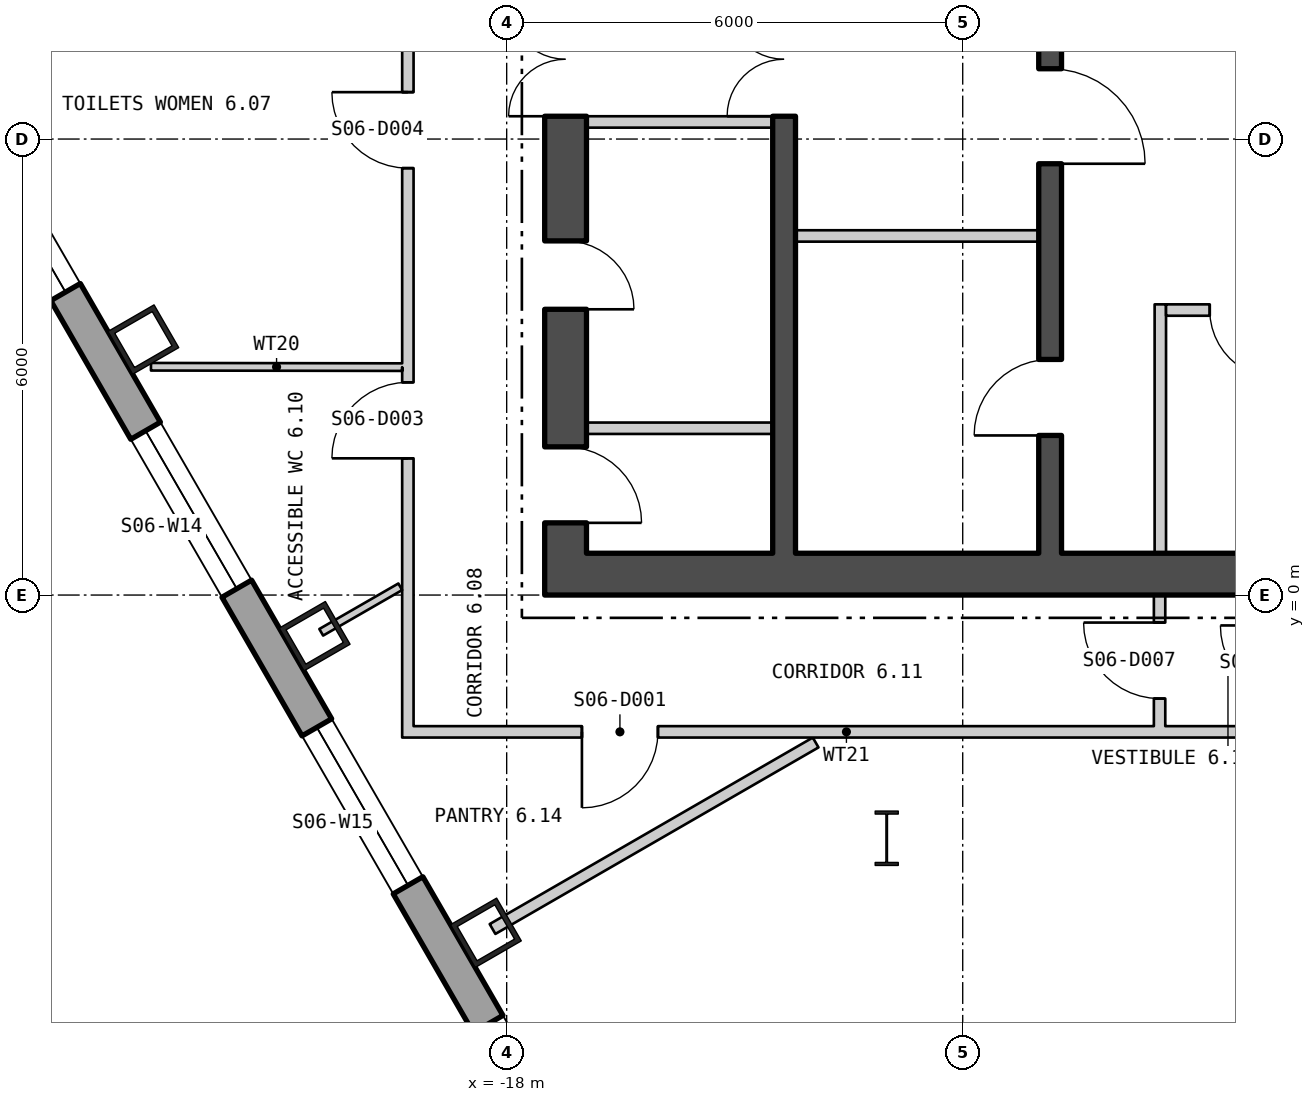
"""IFC4 building model, lengths in metres.
Left out: names, types, materials, properties, quantities, classifications, styles, units other than length and angle.
Written with IfcOpenShell. Run it as: python <this file> out.ifc"""

import sys

from ifc_helpers import new_model, si_unit, direction, frame, frame_2d, origin, origin_2d, place, context, subcontext, project, spatial, polyline, rectangle, hollow_rectangle, i_section, outline, extrude, element, fill, save


model = new_model("IFC4")
c1 = context("Model", 3, precision=1e-05, world=origin(), true_north=direction((0.0, 1.0)))
c2 = subcontext(c1, "Body", "Model", "MODEL_VIEW")
j1 = project(units=[si_unit("LENGTHUNIT", "METRE"), si_unit("PLANEANGLEUNIT", "RADIAN")], contexts=[c1])
p1 = place(None, origin())
s1 = spatial("IfcSite", under=j1, at=p1, CompositionType="ELEMENT")
p2 = place(p1, origin())
s2 = spatial("IfcBuilding", under=s1, at=p2, CompositionType="ELEMENT")
p3 = place(p2, frame((0.0, 0.0, 84.3)))
s3 = spatial("IfcBuildingStorey", under=s2, at=p3, CompositionType="ELEMENT", Elevation=84.3)
for number, where, z_axis, x_axis in (
    (1, (-22.78, 3.362, 0.0), (0.0, 0.0, 1.0), (0.5, -0.866, 0.0)),
    (2, (-20.526, -0.541, 0.0), (0.0, 0.0, 1.0), (0.5, -0.866, 0.0)),
    (3, (-18.273, -4.444, 0.0), (0.0, 0.0, 1.0), (0.5, -0.866, 0.0)),
):
    element("IfcColumn", number, at=place(p3, frame(where, z_axis=z_axis, x_axis=x_axis)), inside=s3, PredefinedType="COLUMN", context=c2, shape_type="SweptSolid", body=[
        extrude(hollow_rectangle(XDim=0.65, YDim=0.7, WallThickness=0.065, at=origin_2d()), origin(), (0.0, 0.0, 1.0), 4.5),
    ])
p4 = place(p3, frame((-13.0, -3.2, 0.0), z_axis=(0.0, 0.0, 1.0), x_axis=(1.0, 0.0, 0.0)))
e4 = element("IfcColumn", 4, at=p4, inside=s3, PredefinedType="COLUMN", context=c2, shape_type="SweptSolid", body=[
    extrude(i_section(OverallWidth=0.304, OverallDepth=0.716, WebThickness=0.021, FlangeThickness=0.04, at=origin_2d()), origin(), (0.0, 0.0, 1.0), 4.5),
])
p5 = place(p3, frame((-27.95, 11.167, -0.18), z_axis=(0.0, 0.0, 1.0), x_axis=(0.499999194392, -0.866025868902, 0.0)))
e5 = element("IfcWall", 5, at=p5, inside=s3, PredefinedType="SOLIDWALL", context=c2, shape_type="SweptSolid", body=[
    extrude(outline(polyline([(-0.13, -0.225), (45.86, -0.225), (45.6, 0.225), (0.13, 0.225), (-0.13, -0.225)])), origin(), (0.0, 0.0, 1.0), 4.28),
])
p6 = place(p5, frame((5.892, 0.0, 1.08)))
e6 = element("IfcOpeningElement", 6, at=p6, cuts=e5, PredefinedType="OPENING", context=c2, shape_type="SweptSolid", body=[
    extrude(rectangle(XDim=2.4, YDim=2.6, at=frame_2d((1.2, 1.3))), frame((0.0, 0.235, 0.0), z_axis=(0.0, -1.0, 0.0), x_axis=(1.0, 0.0, 0.0)), (0.0, 0.0, 1.0), 0.47),
])
p7 = place(p5, frame((10.399, 0.0, 1.08)))
e7 = element("IfcOpeningElement", 7, at=p7, cuts=e5, PredefinedType="OPENING", context=c2, shape_type="SweptSolid", body=[
    extrude(rectangle(XDim=2.4, YDim=2.6, at=frame_2d((1.2, 1.3))), frame((0.0, 0.235, 0.0), z_axis=(0.0, -1.0, 0.0), x_axis=(1.0, 0.0, 0.0)), (0.0, 0.0, 1.0), 0.47),
])
p8 = place(p5, frame((14.905, 0.0, 1.08)))
e8 = element("IfcOpeningElement", 8, at=p8, cuts=e5, PredefinedType="OPENING", context=c2, shape_type="SweptSolid", body=[
    extrude(rectangle(XDim=2.4, YDim=2.6, at=frame_2d((1.2, 1.3))), frame((0.0, 0.235, 0.0), z_axis=(0.0, -1.0, 0.0), x_axis=(1.0, 0.0, 0.0)), (0.0, 0.0, 1.0), 0.47),
])
p9 = place(p5, frame((19.412, 0.0, 1.08)))
e9 = element("IfcOpeningElement", 9, at=p9, cuts=e5, PredefinedType="OPENING", context=c2, shape_type="SweptSolid", body=[
    extrude(rectangle(XDim=2.4, YDim=2.6, at=frame_2d((1.2, 1.3))), frame((0.0, 0.235, 0.0), z_axis=(0.0, -1.0, 0.0), x_axis=(1.0, 0.0, 0.0)), (0.0, 0.0, 1.0), 0.47),
])
p10 = place(p5, frame((23.918, 0.0, 1.08)))
e10 = element("IfcOpeningElement", 10, at=p10, cuts=e5, PredefinedType="OPENING", context=c2, shape_type="SweptSolid", body=[
    extrude(rectangle(XDim=2.4, YDim=2.6, at=frame_2d((1.2, 1.3))), frame((0.0, 0.235, 0.0), z_axis=(0.0, -1.0, 0.0), x_axis=(1.0, 0.0, 0.0)), (0.0, 0.0, 1.0), 0.47),
])
p11 = place(p5, frame((28.425, 0.0, 1.08)))
e11 = element("IfcOpeningElement", 11, at=p11, cuts=e5, PredefinedType="OPENING", context=c2, shape_type="SweptSolid", body=[
    extrude(rectangle(XDim=2.4, YDim=2.6, at=frame_2d((1.2, 1.3))), frame((0.0, 0.235, 0.0), z_axis=(0.0, -1.0, 0.0), x_axis=(1.0, 0.0, 0.0)), (0.0, 0.0, 1.0), 0.47),
])
p12 = place(p5, frame((32.932, 0.0, 1.08)))
e12 = element("IfcOpeningElement", 12, at=p12, cuts=e5, PredefinedType="OPENING", context=c2, shape_type="SweptSolid", body=[
    extrude(rectangle(XDim=2.4, YDim=2.6, at=frame_2d((1.2, 1.3))), frame((0.0, 0.235, 0.0), z_axis=(0.0, -1.0, 0.0), x_axis=(1.0, 0.0, 0.0)), (0.0, 0.0, 1.0), 0.47),
])
p13 = place(p5, frame((37.438, 0.0, 1.08)))
e13 = element("IfcOpeningElement", 13, at=p13, cuts=e5, PredefinedType="OPENING", context=c2, shape_type="SweptSolid", body=[
    extrude(rectangle(XDim=2.4, YDim=2.6, at=frame_2d((1.2, 1.3))), frame((0.0, 0.235, 0.0), z_axis=(0.0, -1.0, 0.0), x_axis=(1.0, 0.0, 0.0)), (0.0, 0.0, 1.0), 0.47),
])
p14 = place(p5, frame((41.907, 0.0, 1.08)))
e14 = element("IfcOpeningElement", 14, at=p14, cuts=e5, PredefinedType="OPENING", context=c2, shape_type="SweptSolid", body=[
    extrude(rectangle(XDim=2.4, YDim=2.6, at=frame_2d((1.2, 1.3))), frame((0.0, 0.235, 0.0), z_axis=(0.0, -1.0, 0.0), x_axis=(1.0, 0.0, 0.0)), (0.0, 0.0, 1.0), 0.47),
])
p15 = place(p3, frame((-17.5, 0.275, 0.0), z_axis=(0.0, 0.0, 1.0), x_axis=(1.0, 0.0, 0.0)))
e15 = element("IfcWall", 15, at=p15, inside=s3, PredefinedType="SHEAR", context=c2, shape_type="SweptSolid", body=[
    extrude(rectangle(XDim=35.0, YDim=0.55, at=frame_2d((17.5, 0.0))), origin(), (0.0, 0.0, 1.0), 4.3),
])
p16 = place(p15, frame((12.0, 0.0, 0.0)))
e16 = element("IfcOpeningElement", 16, at=p16, cuts=e15, PredefinedType="OPENING", context=c2, shape_type="SweptSolid", body=[
    extrude(rectangle(XDim=1.8, YDim=2.4, at=frame_2d((0.9, 1.2))), frame((0.0, 0.285, 0.0), z_axis=(0.0, -1.0, 0.0), x_axis=(1.0, 0.0, 0.0)), (0.0, 0.0, 1.0), 0.57),
])
p17 = place(p15, frame((22.0, 0.0, 0.0)))
e17 = element("IfcOpeningElement", 17, at=p17, cuts=e15, PredefinedType="OPENING", context=c2, shape_type="SweptSolid", body=[
    extrude(rectangle(XDim=1.8, YDim=2.4, at=frame_2d((0.9, 1.2))), frame((0.0, 0.285, 0.0), z_axis=(0.0, -1.0, 0.0), x_axis=(1.0, 0.0, 0.0)), (0.0, 0.0, 1.0), 0.57),
])
p18 = place(p3, frame((-17.225, 0.55, 0.0), z_axis=(0.0, 0.0, 1.0), x_axis=(0.0, 1.0, 0.0)))
e18 = element("IfcWall", 18, at=p18, inside=s3, PredefinedType="SHEAR", context=c2, shape_type="SweptSolid", body=[
    extrude(rectangle(XDim=16.9, YDim=0.55, at=frame_2d((8.45, 0.0))), origin(), (0.0, 0.0, 1.0), 4.3),
])
p19 = place(p18, frame((5.75, 0.0, 0.0)))
e19 = element("IfcOpeningElement", 19, at=p19, cuts=e18, PredefinedType="OPENING", context=c2, shape_type="SweptSolid", body=[
    extrude(rectangle(XDim=1.5, YDim=2.1, at=frame_2d((0.75, 1.05))), frame((0.0, 0.285, 0.0), z_axis=(0.0, -1.0, 0.0), x_axis=(1.0, 0.0, 0.0)), (0.0, 0.0, 1.0), 0.57),
])
p20 = place(p18, frame((0.4, 0.0, 0.0)))
e20 = element("IfcOpeningElement", 20, at=p20, cuts=e18, PredefinedType="OPENING", context=c2, shape_type="SweptSolid", body=[
    extrude(rectangle(XDim=1.0, YDim=2.1, at=frame_2d((0.5, 1.05))), frame((0.0, 0.285, 0.0), z_axis=(0.0, -1.0, 0.0), x_axis=(1.0, 0.0, 0.0)), (0.0, 0.0, 1.0), 0.57),
])
p21 = place(p18, frame((3.21, 0.0, 0.0)))
e21 = element("IfcOpeningElement", 21, at=p21, cuts=e18, PredefinedType="OPENING", context=c2, shape_type="SweptSolid", body=[
    extrude(rectangle(XDim=0.9, YDim=2.1, at=frame_2d((0.45, 1.05))), frame((0.0, 0.285, 0.0), z_axis=(0.0, -1.0, 0.0), x_axis=(1.0, 0.0, 0.0)), (0.0, 0.0, 1.0), 0.57),
])
p22 = place(p18, frame((8.141, 0.0, 0.0)))
e22 = element("IfcOpeningElement", 22, at=p22, cuts=e18, PredefinedType="OPENING", context=c2, shape_type="SweptSolid", body=[
    extrude(rectangle(XDim=0.9, YDim=2.1, at=frame_2d((0.45, 1.05))), frame((0.0, 0.285, 0.0), z_axis=(0.0, -1.0, 0.0), x_axis=(1.0, 0.0, 0.0)), (0.0, 0.0, 1.0), 0.57),
])
p23 = place(p18, frame((12.966, 0.0, 0.0)))
e23 = element("IfcOpeningElement", 23, at=p23, cuts=e18, PredefinedType="OPENING", context=c2, shape_type="SweptSolid", body=[
    extrude(rectangle(XDim=0.9, YDim=2.1, at=frame_2d((0.45, 1.05))), frame((0.0, 0.285, 0.0), z_axis=(0.0, -1.0, 0.0), x_axis=(1.0, 0.0, 0.0)), (0.0, 0.0, 1.0), 0.57),
])
p24 = place(p3, frame((-10.85, 0.55, 0.0), z_axis=(0.0, 0.0, 1.0), x_axis=(0.0, 1.0, 0.0)))
e24 = element("IfcWall", 24, at=p24, inside=s3, PredefinedType="SHEAR", context=c2, shape_type="SweptSolid", body=[
    extrude(rectangle(XDim=16.9, YDim=0.3, at=frame_2d((8.45, 0.0))), origin(), (0.0, 0.0, 1.0), 4.3),
])
p25 = place(p24, frame((5.125, 0.0, 0.0)))
e25 = element("IfcOpeningElement", 25, at=p25, cuts=e24, PredefinedType="OPENING", context=c2, shape_type="SweptSolid", body=[
    extrude(rectangle(XDim=1.25, YDim=2.1, at=frame_2d((0.625, 1.05))), frame((0.0, 0.16, 0.0), z_axis=(0.0, -1.0, 0.0), x_axis=(1.0, 0.0, 0.0)), (0.0, 0.0, 1.0), 0.32),
])
p26 = place(p24, frame((1.55, 0.0, 0.0)))
e26 = element("IfcOpeningElement", 26, at=p26, cuts=e24, PredefinedType="OPENING", context=c2, shape_type="SweptSolid", body=[
    extrude(rectangle(XDim=1.0, YDim=2.1, at=frame_2d((0.5, 1.05))), frame((0.0, 0.16, 0.0), z_axis=(0.0, -1.0, 0.0), x_axis=(1.0, 0.0, 0.0)), (0.0, 0.0, 1.0), 0.32),
])
p27 = place(p3, frame((-14.35, 0.55, 0.0), z_axis=(0.0, 0.0, 1.0), x_axis=(0.0, 1.0, 0.0)))
e27 = element("IfcWall", 27, at=p27, inside=s3, PredefinedType="SHEAR", context=c2, shape_type="SweptSolid", body=[
    extrude(rectangle(XDim=16.9, YDim=0.3, at=frame_2d((8.45, 0.0))), origin(), (0.0, 0.0, 1.0), 4.3),
])
p28 = place(p27, frame((5.75, 0.0, 0.0)))
e28 = element("IfcOpeningElement", 28, at=p28, cuts=e27, PredefinedType="OPENING", context=c2, shape_type="SweptSolid", body=[
    extrude(rectangle(XDim=1.5, YDim=2.1, at=frame_2d((0.75, 1.05))), frame((0.0, 0.16, 0.0), z_axis=(0.0, -1.0, 0.0), x_axis=(1.0, 0.0, 0.0)), (0.0, 0.0, 1.0), 0.32),
])
p29 = place(p3, frame((-14.2, 4.725, 0.0), z_axis=(0.0, 0.0, 1.0), x_axis=(1.0, 0.0, 0.0)))
e29 = element("IfcWall", 29, at=p29, inside=s3, PredefinedType="PARTITIONING", context=c2, shape_type="SweptSolid", body=[
    extrude(rectangle(XDim=3.2, YDim=0.15, at=frame_2d((1.6, 0.0))), origin(), (0.0, 0.0, 1.0), 4.3),
])
for number, where, z_axis, x_axis in (
    (30, (-16.95, 6.225, 0.0), (0.0, 0.0, 1.0), (1.0, 0.0, 0.0)),
    (31, (-16.95, 2.195, 0.0), (0.0, 0.0, 1.0), (1.0, 0.0, 0.0)),
):
    element("IfcWall", number, at=place(p3, frame(where, z_axis=z_axis, x_axis=x_axis)), inside=s3, PredefinedType="PARTITIONING", context=c2, shape_type="SweptSolid", body=[
        extrude(rectangle(XDim=2.45, YDim=0.15, at=frame_2d((1.225, 0.0))), origin(), (0.0, 0.0, 1.0), 4.3),
    ])
p30 = place(p3, frame((-9.4, 0.55, 0.0), z_axis=(0.0, 0.0, 1.0), x_axis=(0.0, 1.0, 0.0)))
e32 = element("IfcWall", 32, at=p30, inside=s3, PredefinedType="PARTITIONING", context=c2, shape_type="SweptSolid", body=[
    extrude(rectangle(XDim=3.275, YDim=0.15, at=frame_2d((1.637, 0.0))), origin(), (0.0, 0.0, 1.0), 4.3),
])
p31 = place(p3, frame((-9.325, 3.75, 0.0), z_axis=(0.0, 0.0, 1.0), x_axis=(1.0, 0.0, 0.0)))
e33 = element("IfcWall", 33, at=p31, inside=s3, PredefinedType="PARTITIONING", context=c2, shape_type="SweptSolid", body=[
    extrude(rectangle(XDim=2.05, YDim=0.15, at=frame_2d((1.025, 0.0))), origin(), (0.0, 0.0, 1.0), 4.3),
])
p32 = place(p31, frame((0.575, 0.0, 0.0)))
e34 = element("IfcOpeningElement", 34, at=p32, cuts=e33, PredefinedType="OPENING", context=c2, shape_type="SweptSolid", body=[
    extrude(rectangle(XDim=0.9, YDim=2.1, at=frame_2d((0.45, 1.05))), frame((0.0, 0.085, 0.0), z_axis=(0.0, -1.0, 0.0), x_axis=(1.0, 0.0, 0.0)), (0.0, 0.0, 1.0), 0.17),
])
p33 = place(p3, frame((-22.68, 3.004, 0.0), z_axis=(0.0, 0.0, 1.0), x_axis=(0.99999885563, -0.001512857573, 0.0)))
e35 = element("IfcWall", 35, at=p33, inside=s3, PredefinedType="PARTITIONING", context=c2, shape_type="SweptSolid", body=[
    extrude(rectangle(XDim=3.305, YDim=0.1, at=frame_2d((1.653, 0.0))), origin(), (0.0, 0.0, 1.0), 3.8),
])
p34 = place(p3, frame((-20.44, -0.49, 0.0), z_axis=(0.0, 0.0, 1.0), x_axis=(0.866546020567, 0.499097179154, 0.0)))
e36 = element("IfcWall", 36, at=p34, inside=s3, PredefinedType="PARTITIONING", context=c2, shape_type="SweptSolid", body=[
    extrude(rectangle(XDim=1.2, YDim=0.1, at=frame_2d((0.6, 0.0))), origin(), (0.0, 0.0, 1.0), 4.3),
])
p35 = place(p3, frame((-19.375, -1.8, 0.0), z_axis=(0.0, 0.0, 1.0), x_axis=(1.0, 0.0, 0.0)))
e37 = element("IfcWall", 37, at=p35, inside=s3, PredefinedType="PARTITIONING", context=c2, shape_type="SweptSolid", body=[
    extrude(rectangle(XDim=11.69, YDim=0.15, at=frame_2d((5.845, 0.0))), origin(), (0.0, 0.0, 1.0), 4.3),
])
p36 = place(p35, frame((2.365, 0.0, 0.0)))
e38 = element("IfcOpeningElement", 38, at=p36, cuts=e37, PredefinedType="OPENING", context=c2, shape_type="SweptSolid", body=[
    extrude(rectangle(XDim=1.0, YDim=2.1, at=frame_2d((0.5, 1.05))), frame((0.0, 0.085, 0.0), z_axis=(0.0, -1.0, 0.0), x_axis=(1.0, 0.0, 0.0)), (0.0, 0.0, 1.0), 0.17),
])
p37 = place(p3, frame((-19.3, -1.725, 0.0), z_axis=(0.0, 0.0, 1.0), x_axis=(0.0, 1.0, 0.0)))
e39 = element("IfcWall", 39, at=p37, inside=s3, PredefinedType="PARTITIONING", context=c2, shape_type="SweptSolid", body=[
    extrude(rectangle(XDim=11.11, YDim=0.15, at=frame_2d((5.555, 0.0))), origin(), (0.0, 0.0, 1.0), 4.3),
])
p38 = place(p37, frame((3.524, 0.0, 0.0)))
e40 = element("IfcOpeningElement", 40, at=p38, cuts=e39, PredefinedType="OPENING", context=c2, shape_type="SweptSolid", body=[
    extrude(rectangle(XDim=1.0, YDim=2.1, at=frame_2d((0.5, 1.05))), frame((0.0, 0.085, 0.0), z_axis=(0.0, -1.0, 0.0), x_axis=(1.0, 0.0, 0.0)), (0.0, 0.0, 1.0), 0.17),
])
p39 = place(p37, frame((7.342, 0.0, 0.0)))
e41 = element("IfcOpeningElement", 41, at=p39, cuts=e39, PredefinedType="OPENING", context=c2, shape_type="SweptSolid", body=[
    extrude(rectangle(XDim=1.0, YDim=2.1, at=frame_2d((0.5, 1.05))), frame((0.0, 0.085, 0.0), z_axis=(0.0, -1.0, 0.0), x_axis=(1.0, 0.0, 0.0)), (0.0, 0.0, 1.0), 0.17),
])
p40 = place(p3, frame((-18.186, -4.394, 0.0), z_axis=(0.0, 0.0, 1.0), x_axis=(0.866053278629, 0.499951716245, 0.0)))
e42 = element("IfcWall", 42, at=p40, inside=s3, PredefinedType="PARTITIONING", context=c2, shape_type="SweptSolid", body=[
    extrude(rectangle(XDim=4.909, YDim=0.15, at=frame_2d((2.454, 0.0))), origin(), (0.0, 0.0, 1.0), 4.3),
])
p41 = place(p3, frame((-9.41, -1.725, 0.0), z_axis=(0.0, 0.0, 1.0), x_axis=(0.0, 1.0, 0.0)))
e43 = element("IfcWall", 43, at=p41, inside=s3, PredefinedType="PARTITIONING", context=c2, shape_type="SweptSolid", body=[
    extrude(rectangle(XDim=1.725, YDim=0.15, at=frame_2d((0.863, 0.0))), origin(), (0.0, 0.0, 1.0), 4.3),
])
p42 = place(p41, frame((0.363, 0.0, 0.0)))
e44 = element("IfcOpeningElement", 44, at=p42, cuts=e43, PredefinedType="OPENING", context=c2, shape_type="SweptSolid", body=[
    extrude(rectangle(XDim=1.0, YDim=2.1, at=frame_2d((0.5, 1.05))), frame((0.0, 0.085, 0.0), z_axis=(0.0, -1.0, 0.0), x_axis=(1.0, 0.0, 0.0)), (0.0, 0.0, 1.0), 0.17),
])
p43 = place(p6, origin())
e45 = element("IfcWindow", 45, at=p43, inside=s3, PartitioningType="SINGLE_PANEL", PredefinedType="WINDOW", context=c2, shape_type="SweptSolid", body=[
    extrude(rectangle(XDim=2.4, YDim=2.6, at=frame_2d((1.2, 1.3))), frame((0.0, 0.105, 0.0), z_axis=(0.0, -1.0, 0.0), x_axis=(1.0, 0.0, 0.0)), (0.0, 0.0, 1.0), 0.06),
])
fill(e6, e45)
p44 = place(p7, origin())
e46 = element("IfcWindow", 46, at=p44, inside=s3, PartitioningType="SINGLE_PANEL", PredefinedType="WINDOW", context=c2, shape_type="SweptSolid", body=[
    extrude(rectangle(XDim=2.4, YDim=2.6, at=frame_2d((1.2, 1.3))), frame((0.0, 0.105, 0.0), z_axis=(0.0, -1.0, 0.0), x_axis=(1.0, 0.0, 0.0)), (0.0, 0.0, 1.0), 0.06),
])
fill(e7, e46)
p45 = place(p8, origin())
e47 = element("IfcWindow", 47, at=p45, inside=s3, PartitioningType="SINGLE_PANEL", PredefinedType="WINDOW", context=c2, shape_type="SweptSolid", body=[
    extrude(rectangle(XDim=2.4, YDim=2.6, at=frame_2d((1.2, 1.3))), frame((0.0, 0.105, 0.0), z_axis=(0.0, -1.0, 0.0), x_axis=(1.0, 0.0, 0.0)), (0.0, 0.0, 1.0), 0.06),
])
fill(e8, e47)
p46 = place(p9, origin())
e48 = element("IfcWindow", 48, at=p46, inside=s3, PartitioningType="SINGLE_PANEL", PredefinedType="WINDOW", context=c2, shape_type="SweptSolid", body=[
    extrude(rectangle(XDim=2.4, YDim=2.6, at=frame_2d((1.2, 1.3))), frame((0.0, 0.105, 0.0), z_axis=(0.0, -1.0, 0.0), x_axis=(1.0, 0.0, 0.0)), (0.0, 0.0, 1.0), 0.06),
])
fill(e9, e48)
p47 = place(p25, origin())
e49 = element("IfcDoor", 49, at=p47, inside=s3, OperationType="SINGLE_SWING_LEFT", PredefinedType="DOOR", context=c2, shape_type="SweptSolid", body=[
    extrude(rectangle(XDim=1.25, YDim=2.1, at=frame_2d((0.625, 1.05))), frame((0.0, 0.025, 0.0), z_axis=(0.0, -1.0, 0.0), x_axis=(1.0, 0.0, 0.0)), (0.0, 0.0, 1.0), 0.05),
])
fill(e25, e49)
p48 = place(p26, origin())
e50 = element("IfcDoor", 50, at=p48, inside=s3, OperationType="SINGLE_SWING_RIGHT", PredefinedType="DOOR", context=c2, shape_type="SweptSolid", body=[
    extrude(rectangle(XDim=1.0, YDim=2.1, at=frame_2d((0.5, 1.05))), frame((0.0, 0.025, 0.0), z_axis=(0.0, -1.0, 0.0), x_axis=(1.0, 0.0, 0.0)), (0.0, 0.0, 1.0), 0.05),
])
fill(e26, e50)
p49 = place(p28, origin())
e51 = element("IfcDoor", 51, at=p49, inside=s3, OperationType="DOUBLE_DOOR_SINGLE_SWING", PredefinedType="DOOR", context=c2, shape_type="SweptSolid", body=[
    extrude(rectangle(XDim=1.5, YDim=2.1, at=frame_2d((0.75, 1.05))), frame((0.0, 0.025, 0.0), z_axis=(0.0, -1.0, 0.0), x_axis=(1.0, 0.0, 0.0)), (0.0, 0.0, 1.0), 0.05),
])
fill(e28, e51)
p50 = place(p19, origin())
e52 = element("IfcDoor", 52, at=p50, inside=s3, OperationType="DOUBLE_DOOR_SINGLE_SWING", PredefinedType="DOOR", context=c2, shape_type="SweptSolid", body=[
    extrude(rectangle(XDim=1.5, YDim=2.1, at=frame_2d((0.75, 1.05))), frame((0.0, 0.025, 0.0), z_axis=(0.0, -1.0, 0.0), x_axis=(1.0, 0.0, 0.0)), (0.0, 0.0, 1.0), 0.05),
])
fill(e19, e52)
p51 = place(p20, origin())
e53 = element("IfcDoor", 53, at=p51, inside=s3, OperationType="SINGLE_SWING_LEFT", PredefinedType="DOOR", context=c2, shape_type="SweptSolid", body=[
    extrude(rectangle(XDim=1.0, YDim=2.1, at=frame_2d((0.5, 1.05))), frame((0.0, 0.025, 0.0), z_axis=(0.0, -1.0, 0.0), x_axis=(1.0, 0.0, 0.0)), (0.0, 0.0, 1.0), 0.05),
])
fill(e20, e53)
p52 = place(p21, origin())
e54 = element("IfcDoor", 54, at=p52, inside=s3, OperationType="SINGLE_SWING_LEFT", PredefinedType="DOOR", context=c2, shape_type="SweptSolid", body=[
    extrude(rectangle(XDim=0.9, YDim=2.1, at=frame_2d((0.45, 1.05))), frame((0.0, 0.025, 0.0), z_axis=(0.0, -1.0, 0.0), x_axis=(1.0, 0.0, 0.0)), (0.0, 0.0, 1.0), 0.05),
])
fill(e21, e54)
p53 = place(p32, origin())
e55 = element("IfcDoor", 55, at=p53, inside=s3, OperationType="SINGLE_SWING_RIGHT", PredefinedType="DOOR", context=c2, shape_type="SweptSolid", body=[
    extrude(rectangle(XDim=0.9, YDim=2.1, at=frame_2d((0.45, 1.05))), frame((0.0, 0.025, 0.0), z_axis=(0.0, -1.0, 0.0), x_axis=(1.0, 0.0, 0.0)), (0.0, 0.0, 1.0), 0.05),
])
fill(e34, e55)
p54 = place(p36, origin())
e56 = element("IfcDoor", 56, at=p54, inside=s3, OperationType="SINGLE_SWING_LEFT", PredefinedType="DOOR", context=c2, shape_type="SweptSolid", body=[
    extrude(rectangle(XDim=1.0, YDim=2.1, at=frame_2d((0.5, 1.05))), frame((0.0, 0.025, 0.0), z_axis=(0.0, -1.0, 0.0), x_axis=(1.0, 0.0, 0.0)), (0.0, 0.0, 1.0), 0.05),
])
fill(e38, e56)
p55 = place(p38, origin())
e57 = element("IfcDoor", 57, at=p55, inside=s3, OperationType="SINGLE_SWING_RIGHT", PredefinedType="DOOR", context=c2, shape_type="SweptSolid", body=[
    extrude(rectangle(XDim=1.0, YDim=2.1, at=frame_2d((0.5, 1.05))), frame((0.0, 0.025, 0.0), z_axis=(0.0, -1.0, 0.0), x_axis=(1.0, 0.0, 0.0)), (0.0, 0.0, 1.0), 0.05),
])
fill(e40, e57)
p56 = place(p39, origin())
e58 = element("IfcDoor", 58, at=p56, inside=s3, OperationType="SINGLE_SWING_LEFT", PredefinedType="DOOR", context=c2, shape_type="SweptSolid", body=[
    extrude(rectangle(XDim=1.0, YDim=2.1, at=frame_2d((0.5, 1.05))), frame((0.0, 0.025, 0.0), z_axis=(0.0, -1.0, 0.0), x_axis=(1.0, 0.0, 0.0)), (0.0, 0.0, 1.0), 0.05),
])
fill(e41, e58)
p57 = place(p42, origin())
e59 = element("IfcDoor", 59, at=p57, inside=s3, OperationType="SINGLE_SWING_LEFT", PredefinedType="DOOR", context=c2, shape_type="SweptSolid", body=[
    extrude(rectangle(XDim=1.0, YDim=2.1, at=frame_2d((0.5, 1.05))), frame((0.0, 0.025, 0.0), z_axis=(0.0, -1.0, 0.0), x_axis=(1.0, 0.0, 0.0)), (0.0, 0.0, 1.0), 0.05),
])
fill(e44, e59)
save(model, sys.argv[1])
